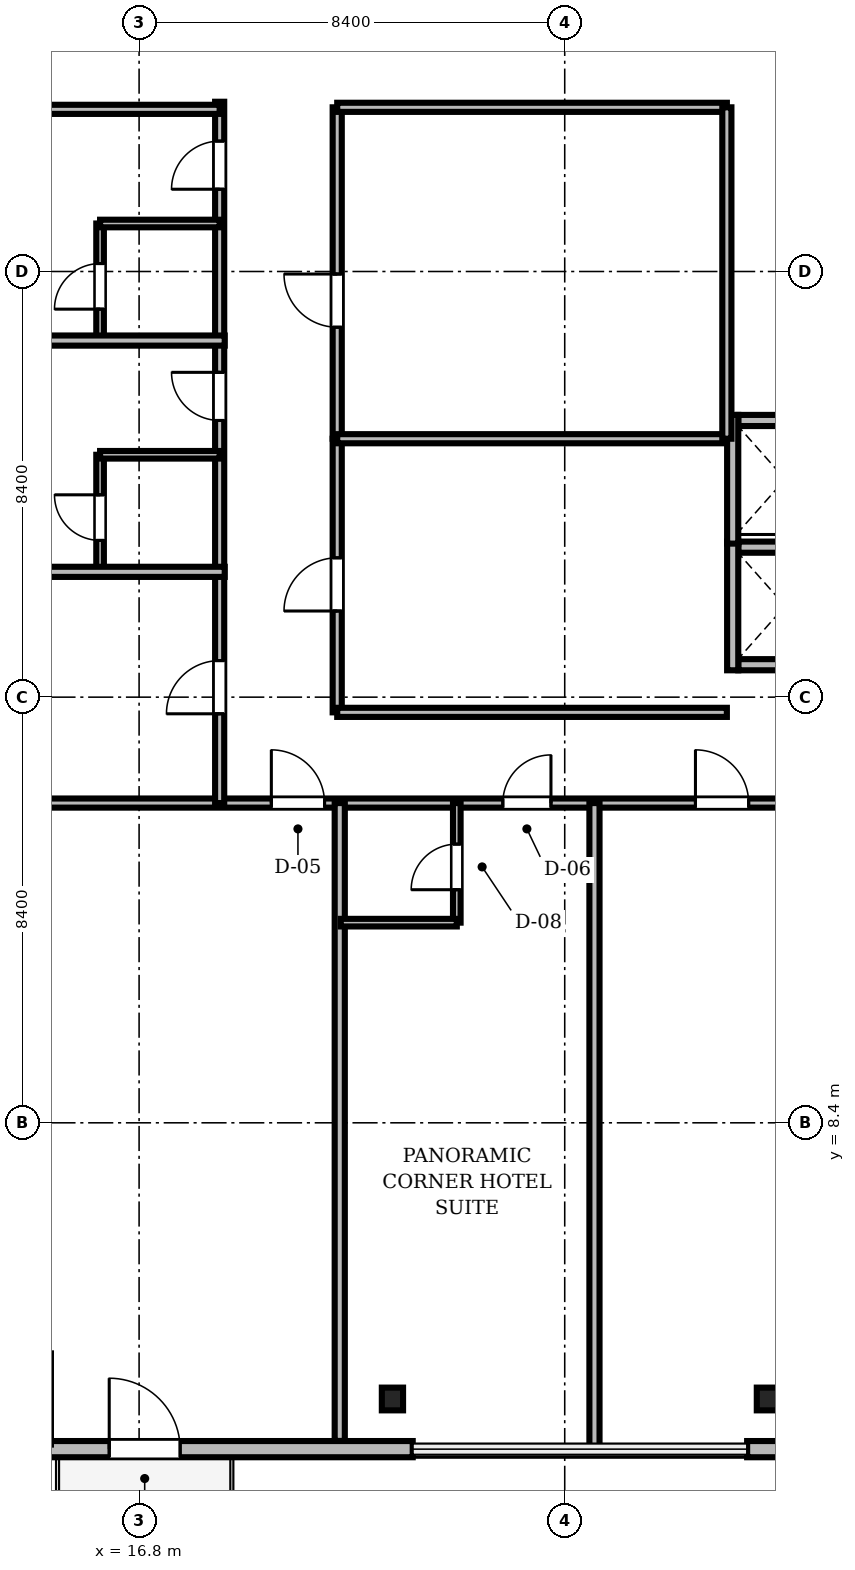
"""IFC4 building model, lengths in metres.
Left out: names, types, materials, properties, quantities, classifications, styles, units other than length and angle.
Written with IfcOpenShell. Run it as: python <this file> out.ifc"""

import sys

from ifc_helpers import new_model, si_unit, direction, frame, frame_2d, origin, origin_2d, place, context, subcontext, project, spatial, rectangle, i_section, extrude, source, transform, mapped, element, fill, save


model = new_model("IFC4")
c1 = context("Model", 3, precision=1e-05, world=origin(), true_north=direction((0.0, 1.0)))
c2 = subcontext(c1, "Body", "Model", "MODEL_VIEW")
j1 = project(units=[si_unit("LENGTHUNIT", "METRE"), si_unit("PLANEANGLEUNIT", "RADIAN")], contexts=[c1])
p1 = place(None, origin())
s1 = spatial("IfcSite", under=j1, at=p1, CompositionType="ELEMENT")
p2 = place(p1, origin())
s2 = spatial("IfcBuilding", under=s1, at=p2, CompositionType="ELEMENT")
p3 = place(p2, frame((0.0, 0.0, 42.2)))
s3 = spatial("IfcBuildingStorey", under=s2, at=p3, CompositionType="ELEMENT", Elevation=42.2)
m1 = source(origin(), c2, "Body", "SweptSolid", [
    extrude(i_section(OverallWidth=0.419, OverallDepth=0.449, WebThickness=0.031, FlangeThickness=0.048, FilletRadius=0.015, at=origin_2d()), origin(), (0.0, 0.0, 1.0), 3.41),
])
for number, where, z_axis, x_axis in (
    (1, (21.8, 2.95, 0.0), (0.0, 0.0, 1.0), (1.0, 0.0, 0.0)),
    (2, (29.2, 2.95, 0.0), (0.0, 0.0, 1.0), (1.0, 0.0, 0.0)),
):
    element("IfcColumn", number, at=place(p3, frame(where, z_axis=z_axis, x_axis=x_axis)), inside=s3, PredefinedType="COLUMN", context=c2, shape_type="MappedRepresentation", body=[
        mapped(m1, transform((0.0, 0.0, 0.0), scale=1.0)),
    ])
m2 = source(origin(), c2, "Body", "SweptSolid", [
    extrude(rectangle(XDim=15.6, YDim=0.32, at=frame_2d((7.8, 0.0))), origin(), (0.0, 0.0, 1.0), 3.41),
])
p4 = place(p3, frame((6.6, 1.96, 0.0), z_axis=(0.0, 0.0, 1.0), x_axis=(1.0, 0.0, 0.0)))
e3 = element("IfcWall", 3, at=p4, inside=s3, PredefinedType="SOLIDWALL", context=c2, shape_type="MappedRepresentation", body=[
    mapped(m2, transform((0.0, 0.0, 0.0), scale=1.0)),
])
m3 = source(origin(), c2, "Body", "SweptSolid", [
    extrude(rectangle(XDim=1.4, YDim=2.3, at=frame_2d((0.7, 1.15))), frame((0.0, 0.17, 0.0), z_axis=(0.0, -1.0, 0.0), x_axis=(1.0, 0.0, 0.0)), (0.0, 0.0, 1.0), 0.34),
])
p5 = place(p4, frame((9.61, 0.0, 0.0)))
e4 = element("IfcOpeningElement", 4, at=p5, cuts=e3, PredefinedType="OPENING", context=c2, shape_type="MappedRepresentation", body=[
    mapped(m3, transform((0.0, 0.0, 0.0), scale=1.0)),
])
m4 = source(origin(), c2, "Body", "SweptSolid", [
    extrude(rectangle(XDim=2.8, YDim=2.4, at=frame_2d((1.4, 1.2))), frame((0.0, 0.17, 0.0), z_axis=(0.0, -1.0, 0.0), x_axis=(1.0, 0.0, 0.0)), (0.0, 0.0, 1.0), 0.34),
])
p6 = place(p4, frame((2.705, 0.0, 0.72)))
e5 = element("IfcOpeningElement", 5, at=p6, cuts=e3, PredefinedType="OPENING", context=c2, shape_type="MappedRepresentation", body=[
    mapped(m4, transform((0.0, 0.0, 0.0), scale=1.0)),
])
p7 = place(p3, frame((28.8, 1.96, 0.0), z_axis=(0.0, 0.0, 1.0), x_axis=(1.0, 0.0, 0.0)))
e6 = element("IfcWall", 6, at=p7, inside=s3, PredefinedType="SOLIDWALL", context=c2, shape_type="MappedRepresentation", body=[
    mapped(m2, transform((0.0, 0.0, 0.0), scale=1.0)),
])
p8 = place(p7, frame((8.745, 0.0, 0.72)))
e7 = element("IfcOpeningElement", 7, at=p8, cuts=e6, PredefinedType="OPENING", context=c2, shape_type="MappedRepresentation", body=[
    mapped(m4, transform((0.0, 0.0, 0.0), scale=1.0)),
])
m5 = source(origin(), c2, "Body", "SweptSolid", [
    extrude(rectangle(XDim=1.85, YDim=0.22, at=frame_2d((0.925, 0.0))), origin(), (0.0, 0.0, 1.0), 3.41),
])
for number, where, z_axis, x_axis in (
    (8, (28.625, 17.44, 0.0), (0.0, 0.0, 1.0), (1.0, 0.0, 0.0)),
    (9, (28.625, 19.76, 0.0), (0.0, 0.0, 1.0), (1.0, 0.0, 0.0)),
):
    element("IfcWall", number, at=place(p3, frame(where, z_axis=z_axis, x_axis=x_axis)), inside=s3, PredefinedType="SOLIDWALL", context=c2, shape_type="MappedRepresentation", body=[
        mapped(m5, transform((0.0, 0.0, 0.0), scale=1.0)),
    ])
m6 = source(origin(), c2, "Body", "SweptSolid", [
    extrude(rectangle(XDim=2.54, YDim=0.22, at=frame_2d((1.27, 0.0))), origin(), (0.0, 0.0, 1.0), 3.41),
])
p9 = place(p3, frame((28.515, 17.33, 0.0), z_axis=(0.0, 0.0, 1.0), x_axis=(0.0, 1.0, 0.0)))
e10 = element("IfcWall", 10, at=p9, inside=s3, PredefinedType="SOLIDWALL", context=c2, shape_type="MappedRepresentation", body=[
    mapped(m6, transform((0.0, 0.0, 0.0), scale=1.0)),
])
p10 = place(p3, frame((28.625, 22.26, 0.0), z_axis=(0.0, 0.0, 1.0), x_axis=(1.0, 0.0, 0.0)))
e11 = element("IfcWall", 11, at=p10, inside=s3, PredefinedType="SOLIDWALL", context=c2, shape_type="MappedRepresentation", body=[
    mapped(m5, transform((0.0, 0.0, 0.0), scale=1.0)),
])
p11 = place(p3, frame((28.515, 19.83, 0.0), z_axis=(0.0, 0.0, 1.0), x_axis=(0.0, 1.0, 0.0)))
e12 = element("IfcWall", 12, at=p11, inside=s3, PredefinedType="SOLIDWALL", context=c2, shape_type="MappedRepresentation", body=[
    mapped(m6, transform((0.0, 0.0, 0.0), scale=1.0)),
])
m7 = source(origin(), c2, "Body", "SweptSolid", [
    extrude(rectangle(XDim=46.156, YDim=0.18, at=frame_2d((23.078, 0.0))), origin(), (0.0, 0.0, 1.0), 2.652),
])
p12 = place(p3, frame((2.422, 14.71, 0.0), z_axis=(0.0, 0.0, 1.0), x_axis=(1.0, 0.0, 0.0)))
e13 = element("IfcWall", 13, at=p12, inside=s3, PredefinedType="PARTITIONING", context=c2, shape_type="MappedRepresentation", body=[
    mapped(m7, transform((0.0, 0.0, 0.0), scale=1.0)),
])
m8 = source(origin(), c2, "Body", "SweptSolid", [
    extrude(rectangle(XDim=1.05, YDim=2.2, at=frame_2d((0.525, 1.1))), frame((0.0, 0.1, 0.0), z_axis=(0.0, -1.0, 0.0), x_axis=(1.0, 0.0, 0.0)), (0.0, 0.0, 1.0), 0.2),
])
p13 = place(p12, frame((16.988, 0.0, 0.0)))
e14 = element("IfcOpeningElement", 14, at=p13, cuts=e13, PredefinedType="OPENING", context=c2, shape_type="MappedRepresentation", body=[
    mapped(m8, transform((0.0, 0.0, 0.0), scale=1.0)),
])
m9 = source(origin(), c2, "Body", "SweptSolid", [
    extrude(rectangle(XDim=0.95, YDim=2.15, at=frame_2d((0.475, 1.075))), frame((0.0, 0.1, 0.0), z_axis=(0.0, -1.0, 0.0), x_axis=(1.0, 0.0, 0.0)), (0.0, 0.0, 1.0), 0.2),
])
p14 = place(p12, frame((21.556, 0.0, 0.0)))
e15 = element("IfcOpeningElement", 15, at=p14, cuts=e13, PredefinedType="OPENING", context=c2, shape_type="MappedRepresentation", body=[
    mapped(m9, transform((0.0, 0.0, 0.0), scale=1.0)),
])
p15 = place(p12, frame((25.358, 0.0, 0.0)))
e16 = element("IfcOpeningElement", 16, at=p15, cuts=e13, PredefinedType="OPENING", context=c2, shape_type="MappedRepresentation", body=[
    mapped(m8, transform((0.0, 0.0, 0.0), scale=1.0)),
])
p16 = place(p12, frame((30.385, 0.0, 0.0)))
e17 = element("IfcOpeningElement", 17, at=p16, cuts=e13, PredefinedType="OPENING", context=c2, shape_type="MappedRepresentation", body=[
    mapped(m8, transform((0.0, 0.0, 0.0), scale=1.0)),
])
p17 = place(p12, frame((35.411, 0.0, 0.0)))
e18 = element("IfcOpeningElement", 18, at=p17, cuts=e13, PredefinedType="OPENING", context=c2, shape_type="MappedRepresentation", body=[
    mapped(m8, transform((0.0, 0.0, 0.0), scale=1.0)),
])
p18 = place(p12, frame((41.766, 0.0, 0.0)))
e19 = element("IfcOpeningElement", 19, at=p18, cuts=e13, PredefinedType="OPENING", context=c2, shape_type="MappedRepresentation", body=[
    mapped(m8, transform((0.0, 0.0, 0.0), scale=1.0)),
])
m10 = source(origin(), c2, "Body", "SweptSolid", [
    extrude(rectangle(XDim=13.84, YDim=0.18, at=frame_2d((6.92, 0.0))), origin(), (0.0, 0.0, 1.0), 2.802),
])
p19 = place(p3, frame((18.39, 14.71, 0.0), z_axis=(0.0, 0.0, 1.0), x_axis=(0.0, 1.0, 0.0)))
e20 = element("IfcWall", 20, at=p19, inside=s3, PredefinedType="PARTITIONING", context=c2, shape_type="MappedRepresentation", body=[
    mapped(m10, transform((0.0, 0.0, 0.0), scale=1.0)),
])
p20 = place(p19, frame((1.762, 0.0, 0.0)))
e21 = element("IfcOpeningElement", 21, at=p20, cuts=e20, PredefinedType="OPENING", context=c2, shape_type="MappedRepresentation", body=[
    mapped(m8, transform((0.0, 0.0, 0.0), scale=1.0)),
])
p21 = place(p19, frame((7.55, 0.0, 0.0)))
e22 = element("IfcOpeningElement", 22, at=p21, cuts=e20, PredefinedType="OPENING", context=c2, shape_type="MappedRepresentation", body=[
    mapped(m9, transform((0.0, 0.0, 0.0), scale=1.0)),
])
p22 = place(p19, frame((12.113, 0.0, 0.0)))
e23 = element("IfcOpeningElement", 23, at=p22, cuts=e20, PredefinedType="OPENING", context=c2, shape_type="MappedRepresentation", body=[
    mapped(m9, transform((0.0, 0.0, 0.0), scale=1.0)),
])
m11 = source(origin(), c2, "Body", "SweptSolid", [
    extrude(rectangle(XDim=6.54, YDim=0.18, at=frame_2d((3.27, 0.0))), origin(), (0.0, 0.0, 1.0), 2.802),
])
p23 = place(p3, frame((20.71, 21.9, 0.0), z_axis=(0.0, 0.0, 1.0), x_axis=(0.0, 1.0, 0.0)))
e24 = element("IfcWall", 24, at=p23, inside=s3, PredefinedType="PARTITIONING", context=c2, shape_type="MappedRepresentation", body=[
    mapped(m11, transform((0.0, 0.0, 0.0), scale=1.0)),
])
p24 = place(p23, frame((2.2, 0.0, 0.0)))
e25 = element("IfcOpeningElement", 25, at=p24, cuts=e24, PredefinedType="OPENING", context=c2, shape_type="MappedRepresentation", body=[
    mapped(m8, transform((0.0, 0.0, 0.0), scale=1.0)),
])
m12 = source(origin(), c2, "Body", "SweptSolid", [
    extrude(rectangle(XDim=5.4, YDim=0.18, at=frame_2d((2.7, 0.0))), origin(), (0.0, 0.0, 1.0), 2.802),
])
p25 = place(p3, frame((20.71, 16.5, 0.0), z_axis=(0.0, 0.0, 1.0), x_axis=(0.0, 1.0, 0.0)))
e26 = element("IfcWall", 26, at=p25, inside=s3, PredefinedType="PARTITIONING", context=c2, shape_type="MappedRepresentation", body=[
    mapped(m12, transform((0.0, 0.0, 0.0), scale=1.0)),
])
p26 = place(p25, frame((2.0, 0.0, 0.0)))
e27 = element("IfcOpeningElement", 27, at=p26, cuts=e26, PredefinedType="OPENING", context=c2, shape_type="MappedRepresentation", body=[
    mapped(m8, transform((0.0, 0.0, 0.0), scale=1.0)),
])
m13 = source(origin(), c2, "Body", "SweptSolid", [
    extrude(rectangle(XDim=2.36, YDim=0.15, at=frame_2d((1.18, 0.0))), origin(), (0.0, 0.0, 1.0), 3.41),
])
p27 = place(p3, frame((23.07, 12.35, 0.0), z_axis=(0.0, 0.0, 1.0), x_axis=(0.0, 1.0, 0.0)))
e28 = element("IfcWall", 28, at=p27, inside=s3, PredefinedType="PARTITIONING", context=c2, shape_type="MappedRepresentation", body=[
    mapped(m13, transform((0.0, 0.0, 0.0), scale=1.0)),
])
m14 = source(origin(), c2, "Body", "SweptSolid", [
    extrude(rectangle(XDim=0.9, YDim=2.1, at=frame_2d((0.45, 1.05))), frame((0.0, 0.085, 0.0), z_axis=(0.0, -1.0, 0.0), x_axis=(1.0, 0.0, 0.0)), (0.0, 0.0, 1.0), 0.17),
])
p28 = place(p27, frame((0.65, 0.0, 0.0)))
e29 = element("IfcOpeningElement", 29, at=p28, cuts=e28, PredefinedType="OPENING", context=c2, shape_type="MappedRepresentation", body=[
    mapped(m14, transform((0.0, 0.0, 0.0), scale=1.0)),
])
m15 = source(origin(), c2, "Body", "SweptSolid", [
    extrude(rectangle(XDim=2.29, YDim=0.15, at=frame_2d((1.145, 0.0))), origin(), (0.0, 0.0, 1.0), 2.802),
])
p29 = place(p3, frame((16.03, 19.293, 0.0), z_axis=(0.0, 0.0, 1.0), x_axis=(0.0, 1.0, 0.0)))
e30 = element("IfcWall", 30, at=p29, inside=s3, PredefinedType="PARTITIONING", context=c2, shape_type="MappedRepresentation", body=[
    mapped(m15, transform((0.0, 0.0, 0.0), scale=1.0)),
])
p30 = place(p29, frame((0.6, 0.0, 0.0)))
e31 = element("IfcOpeningElement", 31, at=p30, cuts=e30, PredefinedType="OPENING", context=c2, shape_type="MappedRepresentation", body=[
    mapped(m14, transform((0.0, 0.0, 0.0), scale=1.0)),
])
m16 = source(origin(), c2, "Body", "SweptSolid", [
    extrude(rectangle(XDim=2.29, YDim=0.15, at=frame_2d((1.145, 0.0))), origin(), (0.0, 0.0, 1.0), 3.41),
])
p31 = place(p3, frame((16.03, 23.857, 0.0), z_axis=(0.0, 0.0, 1.0), x_axis=(0.0, 1.0, 0.0)))
e32 = element("IfcWall", 32, at=p31, inside=s3, PredefinedType="PARTITIONING", context=c2, shape_type="MappedRepresentation", body=[
    mapped(m16, transform((0.0, 0.0, 0.0), scale=1.0)),
])
p32 = place(p31, frame((0.6, 0.0, 0.0)))
e33 = element("IfcOpeningElement", 33, at=p32, cuts=e32, PredefinedType="OPENING", context=c2, shape_type="MappedRepresentation", body=[
    mapped(m14, transform((0.0, 0.0, 0.0), scale=1.0)),
])
m17 = source(origin(), c2, "Body", "SweptSolid", [
    extrude(rectangle(XDim=16.068, YDim=0.2, at=frame_2d((8.034, 0.0))), origin(), (0.0, 0.0, 1.0), 2.652),
])
p33 = place(p3, frame((2.422, 19.273, 0.0), z_axis=(0.0, 0.0, 1.0), x_axis=(1.0, 0.0, 0.0)))
e34 = element("IfcWall", 34, at=p33, inside=s3, PredefinedType="PARTITIONING", context=c2, shape_type="MappedRepresentation", body=[
    mapped(m17, transform((0.0, 0.0, 0.0), scale=1.0)),
])
m18 = source(origin(), c2, "Body", "SweptSolid", [
    extrude(rectangle(XDim=16.26, YDim=0.2, at=frame_2d((8.13, 0.0))), origin(), (0.0, 0.0, 1.0), 2.652),
])
p34 = place(p3, frame((2.23, 23.837, 0.0), z_axis=(0.0, 0.0, 1.0), x_axis=(1.0, 0.0, 0.0)))
e35 = element("IfcWall", 35, at=p34, inside=s3, PredefinedType="PARTITIONING", context=c2, shape_type="MappedRepresentation", body=[
    mapped(m18, transform((0.0, 0.0, 0.0), scale=1.0)),
])
m19 = source(origin(), c2, "Body", "SweptSolid", [
    extrude(rectangle(XDim=16.16, YDim=0.18, at=frame_2d((8.08, 0.0))), origin(), (0.0, 0.0, 1.0), 2.652),
])
p35 = place(p3, frame((2.23, 28.4, 0.0), z_axis=(0.0, 0.0, 1.0), x_axis=(1.0, 0.0, 0.0)))
e36 = element("IfcWall", 36, at=p35, inside=s3, PredefinedType="PARTITIONING", context=c2, shape_type="MappedRepresentation", body=[
    mapped(m19, transform((0.0, 0.0, 0.0), scale=1.0)),
])
m20 = source(origin(), c2, "Body", "SweptSolid", [
    extrude(rectangle(XDim=12.588, YDim=0.2, at=frame_2d((6.294, 0.0))), origin(), (0.0, 0.0, 1.0), 2.652),
])
p36 = place(p3, frame((20.76, 2.122, 0.0), z_axis=(0.0, 0.0, 1.0), x_axis=(0.0, 1.0, 0.0)))
e37 = element("IfcWall", 37, at=p36, inside=s3, PredefinedType="PARTITIONING", context=c2, shape_type="MappedRepresentation", body=[
    mapped(m20, transform((0.0, 0.0, 0.0), scale=1.0)),
])
m21 = source(origin(), c2, "Body", "SweptSolid", [
    extrude(rectangle(XDim=12.78, YDim=0.2, at=frame_2d((6.39, 0.0))), origin(), (0.0, 0.0, 1.0), 2.652),
])
p37 = place(p3, frame((25.787, 1.93, 0.0), z_axis=(0.0, 0.0, 1.0), x_axis=(0.0, 1.0, 0.0)))
e38 = element("IfcWall", 38, at=p37, inside=s3, PredefinedType="PARTITIONING", context=c2, shape_type="MappedRepresentation", body=[
    mapped(m21, transform((0.0, 0.0, 0.0), scale=1.0)),
])
m22 = source(origin(), c2, "Body", "SweptSolid", [
    extrude(rectangle(XDim=7.69, YDim=0.18, at=frame_2d((3.845, 0.0))), origin(), (0.0, 0.0, 1.0), 2.802),
])
p38 = place(p3, frame((20.71, 16.5, 0.0), z_axis=(0.0, 0.0, 1.0), x_axis=(1.0, 0.0, 0.0)))
e39 = element("IfcWall", 39, at=p38, inside=s3, PredefinedType="PARTITIONING", context=c2, shape_type="MappedRepresentation", body=[
    mapped(m22, transform((0.0, 0.0, 0.0), scale=1.0)),
])
m23 = source(origin(), c2, "Body", "SweptSolid", [
    extrude(rectangle(XDim=7.69, YDim=0.18, at=frame_2d((3.845, 0.0))), origin(), (0.0, 0.0, 1.0), 3.41),
])
for number, where, z_axis, x_axis in (
    (40, (20.71, 21.9, 0.0), (0.0, 0.0, 1.0), (1.0, 0.0, 0.0)),
    (41, (20.71, 28.44, 0.0), (0.0, 0.0, 1.0), (1.0, 0.0, 0.0)),
):
    element("IfcWall", number, at=place(p3, frame(where, z_axis=z_axis, x_axis=x_axis)), inside=s3, PredefinedType="PARTITIONING", context=c2, shape_type="MappedRepresentation", body=[
        mapped(m23, transform((0.0, 0.0, 0.0), scale=1.0)),
    ])
p39 = place(p3, frame((28.4, 21.9, 0.0), z_axis=(0.0, 0.0, 1.0), x_axis=(0.0, 1.0, 0.0)))
e42 = element("IfcWall", 42, at=p39, inside=s3, PredefinedType="PARTITIONING", context=c2, shape_type="MappedRepresentation", body=[
    mapped(m11, transform((0.0, 0.0, 0.0), scale=1.0)),
])
for number, where, z_axis, x_axis in (
    (43, (16.03, 21.583, 0.0), (0.0, 0.0, 1.0), (1.0, 0.0, 0.0)),
    (44, (16.03, 26.147, 0.0), (0.0, 0.0, 1.0), (1.0, 0.0, 0.0)),
):
    element("IfcWall", number, at=place(p3, frame(where, z_axis=z_axis, x_axis=x_axis)), inside=s3, PredefinedType="PARTITIONING", context=c2, shape_type="MappedRepresentation", body=[
        mapped(m13, transform((0.0, 0.0, 0.0), scale=1.0)),
    ])
p40 = place(p3, frame((20.78, 12.35, 0.0), z_axis=(0.0, 0.0, 1.0), x_axis=(1.0, 0.0, 0.0)))
e45 = element("IfcWall", 45, at=p40, inside=s3, PredefinedType="PARTITIONING", context=c2, shape_type="MappedRepresentation", body=[
    mapped(m16, transform((0.0, 0.0, 0.0), scale=1.0)),
])
m24 = source(origin(), c2, "Body", "SweptSolid", [
    extrude(rectangle(XDim=1.4, YDim=2.3, at=frame_2d((0.7, 1.15))), frame((0.0, 0.025, 0.0), z_axis=(0.0, -1.0, 0.0), x_axis=(1.0, 0.0, 0.0)), (0.0, 0.0, 1.0), 0.05),
])
p41 = place(p5, frame((1.4, 0.0, 0.0), z_axis=(0.0, 0.0, 1.0), x_axis=(-1.0, 0.0, 0.0)))
e46 = element("IfcDoor", 46, at=p41, inside=s3, OperationType="DOUBLE_DOOR_SLIDING", PredefinedType="DOOR", context=c2, shape_type="MappedRepresentation", body=[
    mapped(m24, transform((0.0, 0.0, 0.0), scale=1.0)),
])
fill(e4, e46)
m25 = source(origin(), c2, "Body", "SweptSolid", [
    extrude(rectangle(XDim=1.05, YDim=2.2, at=frame_2d((0.525, 1.1))), frame((0.0, 0.025, 0.0), z_axis=(0.0, -1.0, 0.0), x_axis=(1.0, 0.0, 0.0)), (0.0, 0.0, 1.0), 0.05),
])
p42 = place(p13, origin())
e47 = element("IfcDoor", 47, at=p42, inside=s3, OperationType="SINGLE_SWING_LEFT", PredefinedType="DOOR", context=c2, shape_type="MappedRepresentation", body=[
    mapped(m25, transform((0.0, 0.0, 0.0), scale=1.0)),
])
fill(e14, e47)
m26 = source(origin(), c2, "Body", "SweptSolid", [
    extrude(rectangle(XDim=0.95, YDim=2.15, at=frame_2d((0.475, 1.075))), frame((0.0, 0.025, 0.0), z_axis=(0.0, -1.0, 0.0), x_axis=(1.0, 0.0, 0.0)), (0.0, 0.0, 1.0), 0.05),
])
p43 = place(p14, origin())
e48 = element("IfcDoor", 48, at=p43, inside=s3, OperationType="SINGLE_SWING_RIGHT", PredefinedType="DOOR", context=c2, shape_type="MappedRepresentation", body=[
    mapped(m26, transform((0.0, 0.0, 0.0), scale=1.0)),
])
fill(e15, e48)
p44 = place(p15, origin())
e49 = element("IfcDoor", 49, at=p44, inside=s3, OperationType="SINGLE_SWING_LEFT", PredefinedType="DOOR", context=c2, shape_type="MappedRepresentation", body=[
    mapped(m25, transform((0.0, 0.0, 0.0), scale=1.0)),
])
fill(e16, e49)
p45 = place(p20, origin())
e50 = element("IfcDoor", 50, at=p45, inside=s3, OperationType="SINGLE_SWING_LEFT", PredefinedType="DOOR", context=c2, shape_type="MappedRepresentation", body=[
    mapped(m25, transform((0.0, 0.0, 0.0), scale=1.0)),
])
fill(e21, e50)
p46 = place(p21, origin())
e51 = element("IfcDoor", 51, at=p46, inside=s3, OperationType="SINGLE_SWING_RIGHT", PredefinedType="DOOR", context=c2, shape_type="MappedRepresentation", body=[
    mapped(m26, transform((0.0, 0.0, 0.0), scale=1.0)),
])
fill(e22, e51)
p47 = place(p22, origin())
e52 = element("IfcDoor", 52, at=p47, inside=s3, OperationType="SINGLE_SWING_LEFT", PredefinedType="DOOR", context=c2, shape_type="MappedRepresentation", body=[
    mapped(m26, transform((0.0, 0.0, 0.0), scale=1.0)),
])
fill(e23, e52)
p48 = place(p24, origin())
e53 = element("IfcDoor", 53, at=p48, inside=s3, OperationType="SINGLE_SWING_RIGHT", PredefinedType="DOOR", context=c2, shape_type="MappedRepresentation", body=[
    mapped(m25, transform((0.0, 0.0, 0.0), scale=1.0)),
])
fill(e25, e53)
p49 = place(p26, origin())
e54 = element("IfcDoor", 54, at=p49, inside=s3, OperationType="SINGLE_SWING_LEFT", PredefinedType="DOOR", context=c2, shape_type="MappedRepresentation", body=[
    mapped(m25, transform((0.0, 0.0, 0.0), scale=1.0)),
])
fill(e27, e54)
m27 = source(origin(), c2, "Body", "SweptSolid", [
    extrude(rectangle(XDim=0.9, YDim=2.1, at=frame_2d((0.45, 1.05))), frame((0.0, 0.025, 0.0), z_axis=(0.0, -1.0, 0.0), x_axis=(1.0, 0.0, 0.0)), (0.0, 0.0, 1.0), 0.05),
])
p50 = place(p28, origin())
e55 = element("IfcDoor", 55, at=p50, inside=s3, OperationType="SINGLE_SWING_LEFT", PredefinedType="DOOR", context=c2, shape_type="MappedRepresentation", body=[
    mapped(m27, transform((0.0, 0.0, 0.0), scale=1.0)),
])
fill(e29, e55)
p51 = place(p30, origin())
e56 = element("IfcDoor", 56, at=p51, inside=s3, OperationType="SINGLE_SWING_RIGHT", PredefinedType="DOOR", context=c2, shape_type="MappedRepresentation", body=[
    mapped(m27, transform((0.0, 0.0, 0.0), scale=1.0)),
])
fill(e31, e56)
p52 = place(p32, origin())
e57 = element("IfcDoor", 57, at=p52, inside=s3, OperationType="SINGLE_SWING_LEFT", PredefinedType="DOOR", context=c2, shape_type="MappedRepresentation", body=[
    mapped(m27, transform((0.0, 0.0, 0.0), scale=1.0)),
])
fill(e33, e57)
save(model, sys.argv[1])
